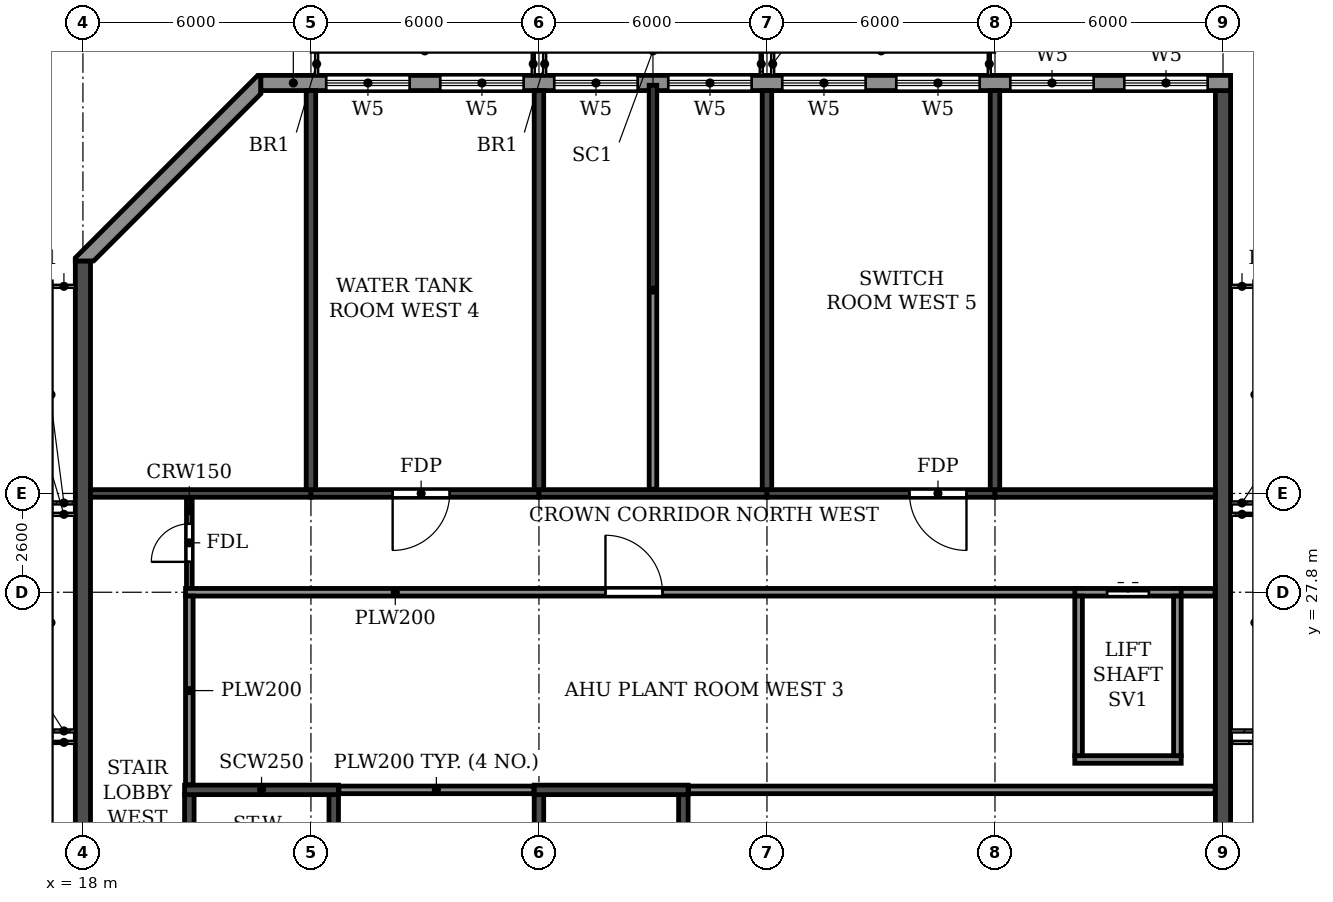
"""IFC4 building model, lengths in metres.
Left out: names, types, materials, properties, quantities, classifications, styles, units other than length and angle.
Written with IfcOpenShell. Run it as: python <this file> out.ifc"""

import sys

from ifc_helpers import new_model, si_unit, direction, frame, frame_2d, origin, place, context, subcontext, project, spatial, polyline, rectangle, outline, extrude, element, fill, save


model = new_model("IFC4")
c1 = context("Model", 3, precision=1e-05, world=origin(), true_north=direction((0.0, 1.0)))
c2 = subcontext(c1, "Body", "Model", "MODEL_VIEW")
j1 = project(units=[si_unit("LENGTHUNIT", "METRE"), si_unit("PLANEANGLEUNIT", "RADIAN")], contexts=[c1])
p1 = place(None, origin())
s1 = spatial("IfcSite", under=j1, at=p1, CompositionType="ELEMENT")
p2 = place(p1, origin())
s2 = spatial("IfcBuilding", under=s1, at=p2, CompositionType="ELEMENT")
p3 = place(p2, frame((0.0, 0.0, 282.3)))
s3 = spatial("IfcBuildingStorey", under=s2, at=p3, CompositionType="ELEMENT", Elevation=282.3)
for number, where, z_axis, x_axis in (
    (1, (24.0, 30.5, 0.0), (0.0, 0.0, 1.0), (0.0, 1.0, 0.0)),
    (2, (30.0, 30.5, 0.0), (0.0, 0.0, 1.0), (0.0, 1.0, 0.0)),
    (3, (36.0, 30.5, 0.0), (0.0, 0.0, 1.0), (0.0, 1.0, 0.0)),
    (4, (42.0, 30.5, 0.0), (0.0, 0.0, 1.0), (0.0, 1.0, 0.0)),
):
    element("IfcWall", number, at=place(p3, frame(where, z_axis=z_axis, x_axis=x_axis)), inside=s3, PredefinedType="SHEAR", context=c2, shape_type="SweptSolid", body=[
        extrude(rectangle(XDim=10.5, YDim=0.25, at=frame_2d((5.25, 0.0))), origin(), (0.0, 0.0, 1.0), 3.05),
    ])
p4 = place(p3, frame((18.0, 4.683, 0.0), z_axis=(0.0, 0.0, 1.0), x_axis=(0.0, 1.0, 0.0)))
e5 = element("IfcWall", 5, at=p4, inside=s3, PredefinedType="SHEAR", context=c2, shape_type="SweptSolid", body=[
    extrude(rectangle(XDim=31.834, YDim=0.4, at=frame_2d((15.917, 0.0))), origin(), (0.0, 0.0, 1.0), 3.05),
])
p5 = place(p3, frame((48.0, 0.2, 0.0), z_axis=(0.0, 0.0, 1.0), x_axis=(0.0, 1.0, 0.0)))
e6 = element("IfcWall", 6, at=p5, inside=s3, PredefinedType="SHEAR", context=c2, shape_type="SweptSolid", body=[
    extrude(rectangle(XDim=40.8, YDim=0.4, at=frame_2d((20.4, 0.0))), origin(), (0.0, 0.0, 1.0), 3.05),
])
p6 = place(p3, frame((18.2, 30.4, 0.0), z_axis=(0.0, 0.0, 1.0), x_axis=(1.0, 0.0, 0.0)))
e7 = element("IfcWall", 7, at=p6, inside=s3, PredefinedType="SHEAR", context=c2, shape_type="SweptSolid", body=[
    extrude(rectangle(XDim=5.8, YDim=0.2, at=frame_2d((2.9, 0.0))), origin(), (0.0, 0.0, 1.0), 2.45),
])
p7 = place(p3, frame((24.0, 30.4, 0.0), z_axis=(0.0, 0.0, 1.0), x_axis=(1.0, 0.0, 0.0)))
e8 = element("IfcWall", 8, at=p7, inside=s3, PredefinedType="SHEAR", context=c2, shape_type="SweptSolid", body=[
    extrude(rectangle(XDim=6.0, YDim=0.2, at=frame_2d((3.0, 0.0))), origin(), (0.0, 0.0, 1.0), 2.45),
])
p8 = place(p7, frame((2.15, 0.0, 0.0)))
e9 = element("IfcOpeningElement", 9, at=p8, cuts=e8, PredefinedType="OPENING", context=c2, shape_type="SweptSolid", body=[
    extrude(rectangle(XDim=1.5, YDim=2.1, at=frame_2d((0.75, 1.05))), frame((0.0, 0.11, 0.0), z_axis=(0.0, -1.0, 0.0), x_axis=(1.0, 0.0, 0.0)), (0.0, 0.0, 1.0), 0.22),
])
p9 = place(p3, frame((30.0, 30.4, 0.0), z_axis=(0.0, 0.0, 1.0), x_axis=(1.0, 0.0, 0.0)))
e10 = element("IfcWall", 10, at=p9, inside=s3, PredefinedType="SHEAR", context=c2, shape_type="SweptSolid", body=[
    extrude(rectangle(XDim=6.0, YDim=0.2, at=frame_2d((3.0, 0.0))), origin(), (0.0, 0.0, 1.0), 2.45),
])
p10 = place(p3, frame((36.0, 30.4, 0.0), z_axis=(0.0, 0.0, 1.0), x_axis=(1.0, 0.0, 0.0)))
e11 = element("IfcWall", 11, at=p10, inside=s3, PredefinedType="SHEAR", context=c2, shape_type="SweptSolid", body=[
    extrude(rectangle(XDim=6.0, YDim=0.2, at=frame_2d((3.0, 0.0))), origin(), (0.0, 0.0, 1.0), 2.45),
])
p11 = place(p10, frame((3.75, 0.0, 0.0)))
e12 = element("IfcOpeningElement", 12, at=p11, cuts=e11, PredefinedType="OPENING", context=c2, shape_type="SweptSolid", body=[
    extrude(rectangle(XDim=1.5, YDim=2.1, at=frame_2d((0.75, 1.05))), frame((0.0, 0.11, 0.0), z_axis=(0.0, -1.0, 0.0), x_axis=(1.0, 0.0, 0.0)), (0.0, 0.0, 1.0), 0.22),
])
p12 = place(p3, frame((42.0, 30.4, 0.0), z_axis=(0.0, 0.0, 1.0), x_axis=(1.0, 0.0, 0.0)))
e13 = element("IfcWall", 13, at=p12, inside=s3, PredefinedType="SHEAR", context=c2, shape_type="SweptSolid", body=[
    extrude(rectangle(XDim=5.8, YDim=0.2, at=frame_2d((2.9, 0.0))), origin(), (0.0, 0.0, 1.0), 2.45),
])
p13 = place(p3, frame((20.8, 14.6, 0.0), z_axis=(0.0, 0.0, 1.0), x_axis=(0.0, 1.0, 0.0)))
e14 = element("IfcWall", 14, at=p13, inside=s3, PredefinedType="SOLIDWALL", context=c2, shape_type="SweptSolid", body=[
    extrude(rectangle(XDim=7.875, YDim=0.25, at=frame_2d((3.938, 0.0))), origin(), (0.0, 0.0, 1.0), 3.05),
])
p14 = place(p13, frame((0.7, 0.0, 0.0)))
e15 = element("IfcOpeningElement", 15, at=p14, cuts=e14, PredefinedType="OPENING", context=c2, shape_type="SweptSolid", body=[
    extrude(rectangle(XDim=1.0, YDim=2.1, at=frame_2d((0.5, 1.05))), frame((0.0, 0.135, 0.0), z_axis=(0.0, -1.0, 0.0), x_axis=(1.0, 0.0, 0.0)), (0.0, 0.0, 1.0), 0.27),
])
p15 = place(p3, frame((24.6, 14.6, 0.0), z_axis=(0.0, 0.0, 1.0), x_axis=(0.0, 1.0, 0.0)))
e16 = element("IfcWall", 16, at=p15, inside=s3, PredefinedType="SOLIDWALL", context=c2, shape_type="SweptSolid", body=[
    extrude(rectangle(XDim=7.875, YDim=0.25, at=frame_2d((3.938, 0.0))), origin(), (0.0, 0.0, 1.0), 3.05),
])
p16 = place(p3, frame((20.675, 22.6, 0.0), z_axis=(0.0, 0.0, 1.0), x_axis=(1.0, 0.0, 0.0)))
e17 = element("IfcWall", 17, at=p16, inside=s3, PredefinedType="SOLIDWALL", context=c2, shape_type="SweptSolid", body=[
    extrude(rectangle(XDim=4.05, YDim=0.25, at=frame_2d((2.025, 0.0))), origin(), (0.0, 0.0, 1.0), 3.05),
])
for number, where, z_axis, x_axis in (
    (18, (30.0, 14.6, 0.0), (0.0, 0.0, 1.0), (0.0, 1.0, 0.0)),
    (19, (33.8, 14.6, 0.0), (0.0, 0.0, 1.0), (0.0, 1.0, 0.0)),
):
    element("IfcWall", number, at=place(p3, frame(where, z_axis=z_axis, x_axis=x_axis)), inside=s3, PredefinedType="SOLIDWALL", context=c2, shape_type="SweptSolid", body=[
        extrude(rectangle(XDim=7.875, YDim=0.25, at=frame_2d((3.938, 0.0))), origin(), (0.0, 0.0, 1.0), 3.05),
    ])
p17 = place(p3, frame((29.875, 22.6, 0.0), z_axis=(0.0, 0.0, 1.0), x_axis=(1.0, 0.0, 0.0)))
e20 = element("IfcWall", 20, at=p17, inside=s3, PredefinedType="SOLIDWALL", context=c2, shape_type="SweptSolid", body=[
    extrude(rectangle(XDim=4.05, YDim=0.25, at=frame_2d((2.025, 0.0))), origin(), (0.0, 0.0, 1.0), 3.05),
])
p18 = place(p3, frame((48.2, 41.2, 0.0), z_axis=(0.0, 0.0, 1.0), x_axis=(-1.0, 0.0, 0.0)))
e21 = element("IfcWall", 21, at=p18, inside=s3, PredefinedType="STANDARD", context=c2, shape_type="SweptSolid", body=[
    extrude(rectangle(XDim=25.517, YDim=0.4, at=frame_2d((12.759, 0.0))), origin(), (0.0, 0.0, 1.0), 3.05),
])
p19 = place(p18, frame((21.6, 0.0, 0.6)))
e22 = element("IfcOpeningElement", 22, at=p19, cuts=e21, PredefinedType="OPENING", context=c2, shape_type="SweptSolid", body=[
    extrude(rectangle(XDim=2.2, YDim=2.4, at=frame_2d((1.1, 1.2))), frame((0.0, 0.21, 0.0), z_axis=(0.0, -1.0, 0.0), x_axis=(1.0, 0.0, 0.0)), (0.0, 0.0, 1.0), 0.42),
])
p20 = place(p18, frame((18.6, 0.0, 0.6)))
e23 = element("IfcOpeningElement", 23, at=p20, cuts=e21, PredefinedType="OPENING", context=c2, shape_type="SweptSolid", body=[
    extrude(rectangle(XDim=2.2, YDim=2.4, at=frame_2d((1.1, 1.2))), frame((0.0, 0.21, 0.0), z_axis=(0.0, -1.0, 0.0), x_axis=(1.0, 0.0, 0.0)), (0.0, 0.0, 1.0), 0.42),
])
p21 = place(p18, frame((15.6, 0.0, 0.6)))
e24 = element("IfcOpeningElement", 24, at=p21, cuts=e21, PredefinedType="OPENING", context=c2, shape_type="SweptSolid", body=[
    extrude(rectangle(XDim=2.2, YDim=2.4, at=frame_2d((1.1, 1.2))), frame((0.0, 0.21, 0.0), z_axis=(0.0, -1.0, 0.0), x_axis=(1.0, 0.0, 0.0)), (0.0, 0.0, 1.0), 0.42),
])
p22 = place(p18, frame((12.6, 0.0, 0.6)))
e25 = element("IfcOpeningElement", 25, at=p22, cuts=e21, PredefinedType="OPENING", context=c2, shape_type="SweptSolid", body=[
    extrude(rectangle(XDim=2.2, YDim=2.4, at=frame_2d((1.1, 1.2))), frame((0.0, 0.21, 0.0), z_axis=(0.0, -1.0, 0.0), x_axis=(1.0, 0.0, 0.0)), (0.0, 0.0, 1.0), 0.42),
])
p23 = place(p18, frame((9.6, 0.0, 0.6)))
e26 = element("IfcOpeningElement", 26, at=p23, cuts=e21, PredefinedType="OPENING", context=c2, shape_type="SweptSolid", body=[
    extrude(rectangle(XDim=2.2, YDim=2.4, at=frame_2d((1.1, 1.2))), frame((0.0, 0.21, 0.0), z_axis=(0.0, -1.0, 0.0), x_axis=(1.0, 0.0, 0.0)), (0.0, 0.0, 1.0), 0.42),
])
p24 = place(p18, frame((6.6, 0.0, 0.6)))
e27 = element("IfcOpeningElement", 27, at=p24, cuts=e21, PredefinedType="OPENING", context=c2, shape_type="SweptSolid", body=[
    extrude(rectangle(XDim=2.2, YDim=2.4, at=frame_2d((1.1, 1.2))), frame((0.0, 0.21, 0.0), z_axis=(0.0, -1.0, 0.0), x_axis=(1.0, 0.0, 0.0)), (0.0, 0.0, 1.0), 0.42),
])
p25 = place(p18, frame((3.6, 0.0, 0.6)))
e28 = element("IfcOpeningElement", 28, at=p25, cuts=e21, PredefinedType="OPENING", context=c2, shape_type="SweptSolid", body=[
    extrude(rectangle(XDim=2.2, YDim=2.4, at=frame_2d((1.1, 1.2))), frame((0.0, 0.21, 0.0), z_axis=(0.0, -1.0, 0.0), x_axis=(1.0, 0.0, 0.0)), (0.0, 0.0, 1.0), 0.42),
])
p26 = place(p18, frame((0.6, 0.0, 0.6)))
e29 = element("IfcOpeningElement", 29, at=p26, cuts=e21, PredefinedType="OPENING", context=c2, shape_type="SweptSolid", body=[
    extrude(rectangle(XDim=2.2, YDim=2.4, at=frame_2d((1.1, 1.2))), frame((0.0, 0.21, 0.0), z_axis=(0.0, -1.0, 0.0), x_axis=(1.0, 0.0, 0.0)), (0.0, 0.0, 1.0), 0.42),
])
p27 = place(p3, origin())
e30 = element("IfcWall", 30, at=p27, inside=s3, PredefinedType="STANDARD", context=c2, shape_type="SweptSolid", body=[
    extrude(outline(polyline([(22.683, 41.4), (22.6, 41.4), (17.8, 36.6), (17.8, 36.517), (18.283, 36.517), (22.683, 40.917), (22.683, 41.4)])), origin(), (0.0, 0.0, 1.0), 3.05),
])
p28 = place(p3, frame((20.8, 27.9, 0.0), z_axis=(0.0, 0.0, 1.0), x_axis=(0.0, 1.0, 0.0)))
e31 = element("IfcWall", 31, at=p28, inside=s3, PredefinedType="PARTITIONING", context=c2, shape_type="SweptSolid", body=[
    extrude(rectangle(XDim=2.39, YDim=0.15, at=frame_2d((1.195, 0.0))), origin(), (0.0, 0.0, 1.0), 3.05),
])
p29 = place(p28, frame((0.7, 0.0, 0.0)))
e32 = element("IfcOpeningElement", 32, at=p29, cuts=e31, PredefinedType="OPENING", context=c2, shape_type="SweptSolid", body=[
    extrude(rectangle(XDim=1.0, YDim=2.1, at=frame_2d((0.5, 1.05))), frame((0.0, 0.085, 0.0), z_axis=(0.0, -1.0, 0.0), x_axis=(1.0, 0.0, 0.0)), (0.0, 0.0, 1.0), 0.17),
])
p30 = place(p3, frame((24.735, 22.6, 0.0), z_axis=(0.0, 0.0, 1.0), x_axis=(1.0, 0.0, 0.0)))
e33 = element("IfcWall", 33, at=p30, inside=s3, PredefinedType="PARTITIONING", context=c2, shape_type="SweptSolid", body=[
    extrude(rectangle(XDim=5.13, YDim=0.2, at=frame_2d((2.565, 0.0))), origin(), (0.0, 0.0, 1.0), 3.05),
])
p31 = place(p3, frame((33.935, 22.6, 0.0), z_axis=(0.0, 0.0, 1.0), x_axis=(1.0, 0.0, 0.0)))
e34 = element("IfcWall", 34, at=p31, inside=s3, PredefinedType="PARTITIONING", context=c2, shape_type="SweptSolid", body=[
    extrude(rectangle(XDim=13.855, YDim=0.2, at=frame_2d((6.927, 0.0))), origin(), (0.0, 0.0, 1.0), 3.05),
])
p32 = place(p3, frame((20.7, 27.8, 0.0), z_axis=(0.0, 0.0, 1.0), x_axis=(1.0, 0.0, 0.0)))
e35 = element("IfcWall", 35, at=p32, inside=s3, PredefinedType="PARTITIONING", context=c2, shape_type="SweptSolid", body=[
    extrude(rectangle(XDim=23.6, YDim=0.2, at=frame_2d((11.8, 0.0))), origin(), (0.0, 0.0, 1.0), 3.05),
])
p33 = place(p32, frame((11.05, 0.0, 0.0)))
e36 = element("IfcOpeningElement", 36, at=p33, cuts=e35, PredefinedType="OPENING", context=c2, shape_type="SweptSolid", body=[
    extrude(rectangle(XDim=1.5, YDim=2.1, at=frame_2d((0.75, 1.05))), frame((0.0, 0.11, 0.0), z_axis=(0.0, -1.0, 0.0), x_axis=(1.0, 0.0, 0.0)), (0.0, 0.0, 1.0), 0.22),
])
p34 = place(p3, frame((46.7, 27.8, 0.0), z_axis=(0.0, 0.0, 1.0), x_axis=(1.0, 0.0, 0.0)))
e37 = element("IfcWall", 37, at=p34, inside=s3, PredefinedType="PARTITIONING", context=c2, shape_type="SweptSolid", body=[
    extrude(rectangle(XDim=1.09, YDim=0.2, at=frame_2d((0.545, 0.0))), origin(), (0.0, 0.0, 1.0), 3.05),
])
p35 = place(p3, frame((20.8, 22.735, 0.0), z_axis=(0.0, 0.0, 1.0), x_axis=(0.0, 1.0, 0.0)))
e38 = element("IfcWall", 38, at=p35, inside=s3, PredefinedType="PARTITIONING", context=c2, shape_type="SweptSolid", body=[
    extrude(rectangle(XDim=4.965, YDim=0.2, at=frame_2d((2.482, 0.0))), origin(), (0.0, 0.0, 1.0), 3.05),
])
p36 = place(p3, frame((33.0, 30.51, 0.0), z_axis=(0.0, 0.0, 1.0), x_axis=(0.0, 1.0, 0.0)))
e39 = element("IfcWall", 39, at=p36, inside=s3, PredefinedType="PARTITIONING", context=c2, shape_type="SweptSolid", body=[
    extrude(rectangle(XDim=10.63, YDim=0.2, at=frame_2d((5.315, 0.0))), origin(), (0.0, 0.0, 1.0), 3.05),
])
p37 = place(p3, frame((44.1, 23.4, 0.0), z_axis=(0.0, 0.0, 1.0), x_axis=(1.0, 0.0, 0.0)))
e40 = element("IfcWall", 40, at=p37, inside=s3, PredefinedType="PARTITIONING", context=c2, shape_type="SweptSolid", body=[
    extrude(rectangle(XDim=2.8, YDim=0.2, at=frame_2d((1.4, 0.0))), origin(), (0.0, 0.0, 1.0), 3.05),
])
p38 = place(p3, frame((44.1, 27.8, 0.0), z_axis=(0.0, 0.0, 1.0), x_axis=(1.0, 0.0, 0.0)))
e41 = element("IfcWall", 41, at=p38, inside=s3, PredefinedType="PARTITIONING", context=c2, shape_type="SweptSolid", body=[
    extrude(rectangle(XDim=2.8, YDim=0.2, at=frame_2d((1.4, 0.0))), origin(), (0.0, 0.0, 1.0), 3.05),
])
p39 = place(p38, frame((0.85, 0.0, 0.0)))
e42 = element("IfcOpeningElement", 42, at=p39, cuts=e41, PredefinedType="OPENING", context=c2, shape_type="SweptSolid", body=[
    extrude(rectangle(XDim=1.1, YDim=2.1, at=frame_2d((0.55, 1.05))), frame((0.0, 0.11, 0.0), z_axis=(0.0, -1.0, 0.0), x_axis=(1.0, 0.0, 0.0)), (0.0, 0.0, 1.0), 0.22),
])
for number, where, z_axis, x_axis in (
    (43, (44.2, 23.5, 0.0), (0.0, 0.0, 1.0), (0.0, 1.0, 0.0)),
    (44, (46.8, 23.5, 0.0), (0.0, 0.0, 1.0), (0.0, 1.0, 0.0)),
):
    element("IfcWall", number, at=place(p3, frame(where, z_axis=z_axis, x_axis=x_axis)), inside=s3, PredefinedType="PARTITIONING", context=c2, shape_type="SweptSolid", body=[
        extrude(rectangle(XDim=4.2, YDim=0.2, at=frame_2d((2.1, 0.0))), origin(), (0.0, 0.0, 1.0), 3.05),
    ])
p40 = place(p19, origin())
e45 = element("IfcWindow", 45, at=p40, inside=s3, PartitioningType="TRIPLE_PANEL_HORIZONTAL", PredefinedType="WINDOW", context=c2, shape_type="SweptSolid", body=[
    extrude(rectangle(XDim=2.2, YDim=2.4, at=frame_2d((1.1, 1.2))), frame((0.0, 0.03, 0.0), z_axis=(0.0, -1.0, 0.0), x_axis=(1.0, 0.0, 0.0)), (0.0, 0.0, 1.0), 0.06),
])
fill(e22, e45)
p41 = place(p20, origin())
e46 = element("IfcWindow", 46, at=p41, inside=s3, PartitioningType="TRIPLE_PANEL_HORIZONTAL", PredefinedType="WINDOW", context=c2, shape_type="SweptSolid", body=[
    extrude(rectangle(XDim=2.2, YDim=2.4, at=frame_2d((1.1, 1.2))), frame((0.0, 0.03, 0.0), z_axis=(0.0, -1.0, 0.0), x_axis=(1.0, 0.0, 0.0)), (0.0, 0.0, 1.0), 0.06),
])
fill(e23, e46)
p42 = place(p21, origin())
e47 = element("IfcWindow", 47, at=p42, inside=s3, PartitioningType="TRIPLE_PANEL_HORIZONTAL", PredefinedType="WINDOW", context=c2, shape_type="SweptSolid", body=[
    extrude(rectangle(XDim=2.2, YDim=2.4, at=frame_2d((1.1, 1.2))), frame((0.0, 0.03, 0.0), z_axis=(0.0, -1.0, 0.0), x_axis=(1.0, 0.0, 0.0)), (0.0, 0.0, 1.0), 0.06),
])
fill(e24, e47)
p43 = place(p22, origin())
e48 = element("IfcWindow", 48, at=p43, inside=s3, PartitioningType="TRIPLE_PANEL_HORIZONTAL", PredefinedType="WINDOW", context=c2, shape_type="SweptSolid", body=[
    extrude(rectangle(XDim=2.2, YDim=2.4, at=frame_2d((1.1, 1.2))), frame((0.0, 0.03, 0.0), z_axis=(0.0, -1.0, 0.0), x_axis=(1.0, 0.0, 0.0)), (0.0, 0.0, 1.0), 0.06),
])
fill(e25, e48)
p44 = place(p23, origin())
e49 = element("IfcWindow", 49, at=p44, inside=s3, PartitioningType="TRIPLE_PANEL_HORIZONTAL", PredefinedType="WINDOW", context=c2, shape_type="SweptSolid", body=[
    extrude(rectangle(XDim=2.2, YDim=2.4, at=frame_2d((1.1, 1.2))), frame((0.0, 0.03, 0.0), z_axis=(0.0, -1.0, 0.0), x_axis=(1.0, 0.0, 0.0)), (0.0, 0.0, 1.0), 0.06),
])
fill(e26, e49)
p45 = place(p24, origin())
e50 = element("IfcWindow", 50, at=p45, inside=s3, PartitioningType="TRIPLE_PANEL_HORIZONTAL", PredefinedType="WINDOW", context=c2, shape_type="SweptSolid", body=[
    extrude(rectangle(XDim=2.2, YDim=2.4, at=frame_2d((1.1, 1.2))), frame((0.0, 0.03, 0.0), z_axis=(0.0, -1.0, 0.0), x_axis=(1.0, 0.0, 0.0)), (0.0, 0.0, 1.0), 0.06),
])
fill(e27, e50)
p46 = place(p25, origin())
e51 = element("IfcWindow", 51, at=p46, inside=s3, PartitioningType="TRIPLE_PANEL_HORIZONTAL", PredefinedType="WINDOW", context=c2, shape_type="SweptSolid", body=[
    extrude(rectangle(XDim=2.2, YDim=2.4, at=frame_2d((1.1, 1.2))), frame((0.0, 0.03, 0.0), z_axis=(0.0, -1.0, 0.0), x_axis=(1.0, 0.0, 0.0)), (0.0, 0.0, 1.0), 0.06),
])
fill(e28, e51)
p47 = place(p26, origin())
e52 = element("IfcWindow", 52, at=p47, inside=s3, PartitioningType="TRIPLE_PANEL_HORIZONTAL", PredefinedType="WINDOW", context=c2, shape_type="SweptSolid", body=[
    extrude(rectangle(XDim=2.2, YDim=2.4, at=frame_2d((1.1, 1.2))), frame((0.0, 0.03, 0.0), z_axis=(0.0, -1.0, 0.0), x_axis=(1.0, 0.0, 0.0)), (0.0, 0.0, 1.0), 0.06),
])
fill(e29, e52)
p48 = place(p8, frame((1.5, 0.0, 0.0), z_axis=(0.0, 0.0, 1.0), x_axis=(-1.0, 0.0, 0.0)))
e53 = element("IfcDoor", 53, at=p48, inside=s3, OperationType="DOUBLE_DOOR_SINGLE_SWING", PredefinedType="DOOR", context=c2, shape_type="SweptSolid", body=[
    extrude(rectangle(XDim=1.5, YDim=2.1, at=frame_2d((0.75, 1.05))), frame((0.0, 0.025, 0.0), z_axis=(0.0, -1.0, 0.0), x_axis=(1.0, 0.0, 0.0)), (0.0, 0.0, 1.0), 0.05),
])
fill(e9, e53)
p49 = place(p33, origin())
e54 = element("IfcDoor", 54, at=p49, inside=s3, OperationType="DOUBLE_DOOR_SINGLE_SWING", PredefinedType="DOOR", context=c2, shape_type="SweptSolid", body=[
    extrude(rectangle(XDim=1.5, YDim=2.1, at=frame_2d((0.75, 1.05))), frame((0.0, 0.025, 0.0), z_axis=(0.0, -1.0, 0.0), x_axis=(1.0, 0.0, 0.0)), (0.0, 0.0, 1.0), 0.05),
])
fill(e36, e54)
p50 = place(p11, frame((1.5, 0.0, 0.0), z_axis=(0.0, 0.0, 1.0), x_axis=(-1.0, 0.0, 0.0)))
e55 = element("IfcDoor", 55, at=p50, inside=s3, OperationType="DOUBLE_DOOR_SINGLE_SWING", PredefinedType="DOOR", context=c2, shape_type="SweptSolid", body=[
    extrude(rectangle(XDim=1.5, YDim=2.1, at=frame_2d((0.75, 1.05))), frame((0.0, 0.025, 0.0), z_axis=(0.0, -1.0, 0.0), x_axis=(1.0, 0.0, 0.0)), (0.0, 0.0, 1.0), 0.05),
])
fill(e12, e55)
p51 = place(p39, origin())
e56 = element("IfcDoor", 56, at=p51, inside=s3, OperationType="DOUBLE_DOOR_SLIDING", PredefinedType="DOOR", context=c2, shape_type="SweptSolid", body=[
    extrude(rectangle(XDim=1.1, YDim=2.1, at=frame_2d((0.55, 1.05))), frame((0.0, 0.025, 0.0), z_axis=(0.0, -1.0, 0.0), x_axis=(1.0, 0.0, 0.0)), (0.0, 0.0, 1.0), 0.05),
])
fill(e42, e56)
p52 = place(p29, origin())
e57 = element("IfcDoor", 57, at=p52, inside=s3, OperationType="SINGLE_SWING_LEFT", PredefinedType="DOOR", context=c2, shape_type="SweptSolid", body=[
    extrude(rectangle(XDim=1.0, YDim=2.1, at=frame_2d((0.5, 1.05))), frame((0.0, 0.025, 0.0), z_axis=(0.0, -1.0, 0.0), x_axis=(1.0, 0.0, 0.0)), (0.0, 0.0, 1.0), 0.05),
])
fill(e32, e57)
save(model, sys.argv[1])
